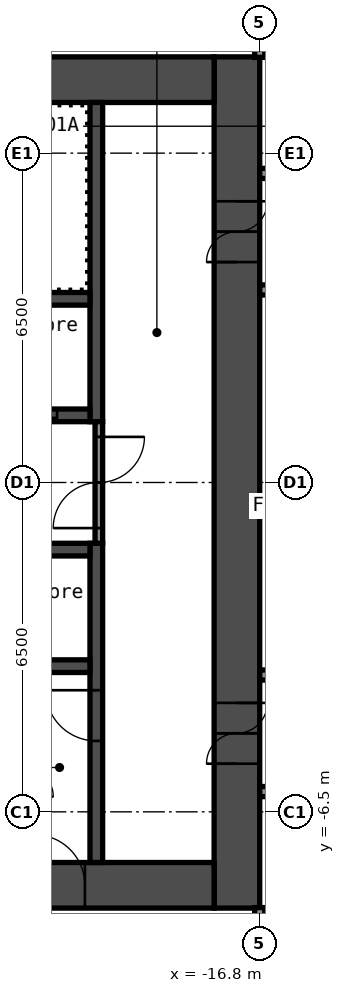
"""IFC4 building model, lengths in metres.
Left out: names, types, materials, properties, quantities, classifications, styles, units other than length and angle.
Written with IfcOpenShell. Run it as: python <this file> out.ifc"""

import sys

from ifc_helpers import new_model, si_unit, direction, frame, frame_2d, origin, place, context, subcontext, project, spatial, rectangle, extrude, element, fill, save


model = new_model("IFC4")
c1 = context("Model", 3, precision=1e-05, world=origin(), true_north=direction((0.0, 1.0)))
c2 = subcontext(c1, "Body", "Model", "MODEL_VIEW")
j1 = project(units=[si_unit("LENGTHUNIT", "METRE"), si_unit("PLANEANGLEUNIT", "RADIAN")], contexts=[c1])
p1 = place(None, origin())
s1 = spatial("IfcSite", under=j1, at=p1, CompositionType="ELEMENT")
p2 = place(p1, origin())
s2 = spatial("IfcBuilding", under=s1, at=p2, CompositionType="ELEMENT")
p3 = place(p2, frame((0.0, 0.0, 29.4)))
s3 = spatial("IfcBuildingStorey", under=s2, at=p3, CompositionType="ELEMENT", Elevation=29.4)
p4 = place(p3, frame((-17.25, -8.4, 0.0), z_axis=(0.0, 0.0, 1.0), x_axis=(0.0, 1.0, 0.0)))
e1 = element("IfcWall", 1, at=p4, inside=s3, PredefinedType="SHEAR", context=c2, shape_type="SweptSolid", body=[
    extrude(rectangle(XDim=16.8, YDim=0.9, at=frame_2d((8.4, 0.0))), origin(), (0.0, 0.0, 1.0), 2.8),
])
p5 = place(p4, frame((12.75, 0.0, 0.0)))
e2 = element("IfcOpeningElement", 2, at=p5, cuts=e1, PredefinedType="OPENING", context=c2, shape_type="SweptSolid", body=[
    extrude(rectangle(XDim=1.2, YDim=2.1, at=frame_2d((0.6, 1.05))), frame((0.0, 0.46, 0.0), z_axis=(0.0, -1.0, 0.0), x_axis=(1.0, 0.0, 0.0)), (0.0, 0.0, 1.0), 0.92),
])
p6 = place(p4, frame((2.85, 0.0, 0.0)))
e3 = element("IfcOpeningElement", 3, at=p6, cuts=e1, PredefinedType="OPENING", context=c2, shape_type="SweptSolid", body=[
    extrude(rectangle(XDim=1.2, YDim=2.1, at=frame_2d((0.6, 1.05))), frame((0.0, 0.46, 0.0), z_axis=(0.0, -1.0, 0.0), x_axis=(1.0, 0.0, 0.0)), (0.0, 0.0, 1.0), 0.92),
])
p7 = place(p3, frame((-32.7, 7.95, 0.0), z_axis=(0.0, 0.0, 1.0), x_axis=(1.0, 0.0, 0.0)))
e4 = element("IfcWall", 4, at=p7, inside=s3, PredefinedType="SHEAR", context=c2, shape_type="SweptSolid", body=[
    extrude(rectangle(XDim=15.0, YDim=0.9, at=frame_2d((7.5, 0.0))), origin(), (0.0, 0.0, 1.0), 2.8),
])
p8 = place(p7, frame((3.4, 0.0, 0.0)))
e5 = element("IfcOpeningElement", 5, at=p8, cuts=e4, PredefinedType="OPENING", context=c2, shape_type="SweptSolid", body=[
    extrude(rectangle(XDim=1.2, YDim=2.1, at=frame_2d((0.6, 1.05))), frame((0.0, 0.46, 0.0), z_axis=(0.0, -1.0, 0.0), x_axis=(1.0, 0.0, 0.0)), (0.0, 0.0, 1.0), 0.92),
])
p9 = place(p7, frame((0.75, 0.0, 0.0)))
e6 = element("IfcOpeningElement", 6, at=p9, cuts=e4, PredefinedType="OPENING", context=c2, shape_type="SweptSolid", body=[
    extrude(rectangle(XDim=0.9, YDim=2.1, at=frame_2d((0.45, 1.05))), frame((0.0, 0.46, 0.0), z_axis=(0.0, -1.0, 0.0), x_axis=(1.0, 0.0, 0.0)), (0.0, 0.0, 1.0), 0.92),
])
p10 = place(p3, frame((-32.7, -7.95, 0.0), z_axis=(0.0, 0.0, 1.0), x_axis=(1.0, 0.0, 0.0)))
e7 = element("IfcWall", 7, at=p10, inside=s3, PredefinedType="SHEAR", context=c2, shape_type="SweptSolid", body=[
    extrude(rectangle(XDim=15.0, YDim=0.9, at=frame_2d((7.5, 0.0))), origin(), (0.0, 0.0, 1.0), 2.8),
])
p11 = place(p10, frame((11.45, 0.0, 0.0)))
e8 = element("IfcOpeningElement", 8, at=p11, cuts=e7, PredefinedType="OPENING", context=c2, shape_type="SweptSolid", body=[
    extrude(rectangle(XDim=1.0, YDim=2.1, at=frame_2d((0.5, 1.05))), frame((0.0, 0.46, 0.0), z_axis=(0.0, -1.0, 0.0), x_axis=(1.0, 0.0, 0.0)), (0.0, 0.0, 1.0), 0.92),
])
p12 = place(p3, frame((-20.025, 1.2, 0.0), z_axis=(0.0, 0.0, 1.0), x_axis=(0.0, 1.0, 0.0)))
e9 = element("IfcWall", 9, at=p12, inside=s3, PredefinedType="SHEAR", context=c2, shape_type="SweptSolid", body=[
    extrude(rectangle(XDim=6.3, YDim=0.25, at=frame_2d((3.15, 0.0))), origin(), (0.0, 0.0, 1.0), 2.8),
])
p13 = place(p3, frame((-20.025, -7.5, 0.0), z_axis=(0.0, 0.0, 1.0), x_axis=(0.0, 1.0, 0.0)))
e10 = element("IfcWall", 10, at=p13, inside=s3, PredefinedType="SHEAR", context=c2, shape_type="SweptSolid", body=[
    extrude(rectangle(XDim=6.3, YDim=0.25, at=frame_2d((3.15, 0.0))), origin(), (0.0, 0.0, 1.0), 2.8),
])
p14 = place(p13, frame((2.4, 0.0, 0.0)))
e11 = element("IfcOpeningElement", 11, at=p14, cuts=e10, PredefinedType="OPENING", context=c2, shape_type="SweptSolid", body=[
    extrude(rectangle(XDim=1.0, YDim=2.1, at=frame_2d((0.5, 1.05))), frame((0.0, 0.135, 0.0), z_axis=(0.0, -1.0, 0.0), x_axis=(1.0, 0.0, 0.0)), (0.0, 0.0, 1.0), 0.27),
])
p15 = place(p3, frame((-27.65, 1.325, 0.0), z_axis=(0.0, 0.0, 1.0), x_axis=(1.0, 0.0, 0.0)))
e12 = element("IfcWall", 12, at=p15, inside=s3, PredefinedType="SHEAR", context=c2, shape_type="SweptSolid", body=[
    extrude(rectangle(XDim=7.5, YDim=0.25, at=frame_2d((3.75, 0.0))), origin(), (0.0, 0.0, 1.0), 2.8),
])
p16 = place(p15, frame((5.75, 0.0, 0.0)))
e13 = element("IfcOpeningElement", 13, at=p16, cuts=e12, PredefinedType="OPENING", context=c2, shape_type="SweptSolid", body=[
    extrude(rectangle(XDim=1.1, YDim=2.1, at=frame_2d((0.55, 1.05))), frame((0.0, 0.135, 0.0), z_axis=(0.0, -1.0, 0.0), x_axis=(1.0, 0.0, 0.0)), (0.0, 0.0, 1.0), 0.27),
])
p17 = place(p15, frame((3.35, 0.0, 0.0)))
e14 = element("IfcOpeningElement", 14, at=p17, cuts=e12, PredefinedType="OPENING", context=c2, shape_type="SweptSolid", body=[
    extrude(rectangle(XDim=1.1, YDim=2.1, at=frame_2d((0.55, 1.05))), frame((0.0, 0.135, 0.0), z_axis=(0.0, -1.0, 0.0), x_axis=(1.0, 0.0, 0.0)), (0.0, 0.0, 1.0), 0.27),
])
p18 = place(p15, frame((0.95, 0.0, 0.0)))
e15 = element("IfcOpeningElement", 15, at=p18, cuts=e12, PredefinedType="OPENING", context=c2, shape_type="SweptSolid", body=[
    extrude(rectangle(XDim=1.1, YDim=2.1, at=frame_2d((0.55, 1.05))), frame((0.0, 0.135, 0.0), z_axis=(0.0, -1.0, 0.0), x_axis=(1.0, 0.0, 0.0)), (0.0, 0.0, 1.0), 0.27),
])
for number, where, z_axis, x_axis in (
    (16, (-27.65, 3.625, 0.0), (0.0, 0.0, 1.0), (1.0, 0.0, 0.0)),
    (17, (-27.65, -1.325, 0.0), (0.0, 0.0, 1.0), (1.0, 0.0, 0.0)),
    (18, (-27.65, -3.625, 0.0), (0.0, 0.0, 1.0), (1.0, 0.0, 0.0)),
):
    element("IfcWall", number, at=place(p3, frame(where, z_axis=z_axis, x_axis=x_axis)), inside=s3, PredefinedType="SHEAR", context=c2, shape_type="SweptSolid", body=[
        extrude(rectangle(XDim=7.5, YDim=0.25, at=frame_2d((3.75, 0.0))), origin(), (0.0, 0.0, 1.0), 2.8),
    ])
p19 = place(p3, frame((-19.975, -1.2, 0.0), z_axis=(0.0, 0.0, 1.0), x_axis=(0.0, 1.0, 0.0)))
e19 = element("IfcWall", 19, at=p19, inside=s3, PredefinedType="PARTITIONING", context=c2, shape_type="SweptSolid", body=[
    extrude(rectangle(XDim=2.4, YDim=0.15, at=frame_2d((1.2, 0.0))), origin(), (0.0, 0.0, 1.0), 2.8),
])
p20 = place(p19, frame((0.3, 0.0, 0.0)))
e20 = element("IfcOpeningElement", 20, at=p20, cuts=e19, PredefinedType="OPENING", context=c2, shape_type="SweptSolid", body=[
    extrude(rectangle(XDim=1.8, YDim=2.1, at=frame_2d((0.9, 1.05))), frame((0.0, 0.085, 0.0), z_axis=(0.0, -1.0, 0.0), x_axis=(1.0, 0.0, 0.0)), (0.0, 0.0, 1.0), 0.17),
])
p21 = place(p3, frame((-16.8, -6.1, 0.0), z_axis=(0.0, 0.0, 1.0), x_axis=(1.0, 0.0, 0.0)))
e21 = element("IfcWall", 21, at=p21, inside=s3, PredefinedType="PARTITIONING", context=c2, shape_type="SweptSolid", body=[
    extrude(rectangle(XDim=33.6, YDim=0.2, at=frame_2d((16.8, 0.0))), origin(), (0.0, 0.0, 1.0), 2.8),
])
p22 = place(p21, frame((2.85, 0.0, 0.0)))
e22 = element("IfcOpeningElement", 22, at=p22, cuts=e21, PredefinedType="OPENING", context=c2, shape_type="SweptSolid", body=[
    extrude(rectangle(XDim=1.0, YDim=2.1, at=frame_2d((0.5, 1.05))), frame((0.0, 0.11, 0.0), z_axis=(0.0, -1.0, 0.0), x_axis=(1.0, 0.0, 0.0)), (0.0, 0.0, 1.0), 0.22),
])
p23 = place(p21, frame((4.55, 0.0, 0.0)))
e23 = element("IfcOpeningElement", 23, at=p23, cuts=e21, PredefinedType="OPENING", context=c2, shape_type="SweptSolid", body=[
    extrude(rectangle(XDim=1.0, YDim=2.1, at=frame_2d((0.5, 1.05))), frame((0.0, 0.11, 0.0), z_axis=(0.0, -1.0, 0.0), x_axis=(1.0, 0.0, 0.0)), (0.0, 0.0, 1.0), 0.22),
])
p24 = place(p21, frame((12.1, 0.0, 0.0)))
e24 = element("IfcOpeningElement", 24, at=p24, cuts=e21, PredefinedType="OPENING", context=c2, shape_type="SweptSolid", body=[
    extrude(rectangle(XDim=1.0, YDim=2.1, at=frame_2d((0.5, 1.05))), frame((0.0, 0.11, 0.0), z_axis=(0.0, -1.0, 0.0), x_axis=(1.0, 0.0, 0.0)), (0.0, 0.0, 1.0), 0.22),
])
p25 = place(p21, frame((19.65, 0.0, 0.0)))
e25 = element("IfcOpeningElement", 25, at=p25, cuts=e21, PredefinedType="OPENING", context=c2, shape_type="SweptSolid", body=[
    extrude(rectangle(XDim=1.0, YDim=2.1, at=frame_2d((0.5, 1.05))), frame((0.0, 0.11, 0.0), z_axis=(0.0, -1.0, 0.0), x_axis=(1.0, 0.0, 0.0)), (0.0, 0.0, 1.0), 0.22),
])
p26 = place(p21, frame((21.35, 0.0, 0.0)))
e26 = element("IfcOpeningElement", 26, at=p26, cuts=e21, PredefinedType="OPENING", context=c2, shape_type="SweptSolid", body=[
    extrude(rectangle(XDim=1.0, YDim=2.1, at=frame_2d((0.5, 1.05))), frame((0.0, 0.11, 0.0), z_axis=(0.0, -1.0, 0.0), x_axis=(1.0, 0.0, 0.0)), (0.0, 0.0, 1.0), 0.22),
])
p27 = place(p21, frame((27.2, 0.0, 0.0)))
e27 = element("IfcOpeningElement", 27, at=p27, cuts=e21, PredefinedType="OPENING", context=c2, shape_type="SweptSolid", body=[
    extrude(rectangle(XDim=1.0, YDim=2.1, at=frame_2d((0.5, 1.05))), frame((0.0, 0.11, 0.0), z_axis=(0.0, -1.0, 0.0), x_axis=(1.0, 0.0, 0.0)), (0.0, 0.0, 1.0), 0.22),
])
p28 = place(p3, frame((-16.8, -3.8, 0.0), z_axis=(0.0, 0.0, 1.0), x_axis=(1.0, 0.0, 0.0)))
e28 = element("IfcWall", 28, at=p28, inside=s3, PredefinedType="PARTITIONING", context=c2, shape_type="SweptSolid", body=[
    extrude(rectangle(XDim=33.6, YDim=0.2, at=frame_2d((16.8, 0.0))), origin(), (0.0, 0.0, 1.0), 2.8),
])
p29 = place(p28, frame((10.22, 0.0, 0.0)))
e29 = element("IfcOpeningElement", 29, at=p29, cuts=e28, PredefinedType="OPENING", context=c2, shape_type="SweptSolid", body=[
    extrude(rectangle(XDim=0.9, YDim=2.1, at=frame_2d((0.45, 1.05))), frame((0.0, 0.11, 0.0), z_axis=(0.0, -1.0, 0.0), x_axis=(1.0, 0.0, 0.0)), (0.0, 0.0, 1.0), 0.22),
])
p30 = place(p28, frame((14.42, 0.0, 0.0)))
e30 = element("IfcOpeningElement", 30, at=p30, cuts=e28, PredefinedType="OPENING", context=c2, shape_type="SweptSolid", body=[
    extrude(rectangle(XDim=0.9, YDim=2.1, at=frame_2d((0.45, 1.05))), frame((0.0, 0.11, 0.0), z_axis=(0.0, -1.0, 0.0), x_axis=(1.0, 0.0, 0.0)), (0.0, 0.0, 1.0), 0.22),
])
p31 = place(p28, frame((26.6, 0.0, 0.0)))
e31 = element("IfcOpeningElement", 31, at=p31, cuts=e28, PredefinedType="OPENING", context=c2, shape_type="SweptSolid", body=[
    extrude(rectangle(XDim=0.9, YDim=2.1, at=frame_2d((0.45, 1.05))), frame((0.0, 0.11, 0.0), z_axis=(0.0, -1.0, 0.0), x_axis=(1.0, 0.0, 0.0)), (0.0, 0.0, 1.0), 0.22),
])
p32 = place(p28, frame((30.8, 0.0, 0.0)))
e32 = element("IfcOpeningElement", 32, at=p32, cuts=e28, PredefinedType="OPENING", context=c2, shape_type="SweptSolid", body=[
    extrude(rectangle(XDim=0.9, YDim=2.1, at=frame_2d((0.45, 1.05))), frame((0.0, 0.11, 0.0), z_axis=(0.0, -1.0, 0.0), x_axis=(1.0, 0.0, 0.0)), (0.0, 0.0, 1.0), 0.22),
])
p33 = place(p3, frame((-16.8, 3.8, 0.0), z_axis=(0.0, 0.0, 1.0), x_axis=(1.0, 0.0, 0.0)))
e33 = element("IfcWall", 33, at=p33, inside=s3, PredefinedType="PARTITIONING", context=c2, shape_type="SweptSolid", body=[
    extrude(rectangle(XDim=33.6, YDim=0.2, at=frame_2d((16.8, 0.0))), origin(), (0.0, 0.0, 1.0), 2.8),
])
p34 = place(p33, frame((1.23, 0.0, 0.0)))
e34 = element("IfcOpeningElement", 34, at=p34, cuts=e33, PredefinedType="OPENING", context=c2, shape_type="SweptSolid", body=[
    extrude(rectangle(XDim=0.9, YDim=2.1, at=frame_2d((0.45, 1.05))), frame((0.0, 0.11, 0.0), z_axis=(0.0, -1.0, 0.0), x_axis=(1.0, 0.0, 0.0)), (0.0, 0.0, 1.0), 0.22),
])
p35 = place(p33, frame((5.43, 0.0, 0.0)))
e35 = element("IfcOpeningElement", 35, at=p35, cuts=e33, PredefinedType="OPENING", context=c2, shape_type="SweptSolid", body=[
    extrude(rectangle(XDim=0.9, YDim=2.1, at=frame_2d((0.45, 1.05))), frame((0.0, 0.11, 0.0), z_axis=(0.0, -1.0, 0.0), x_axis=(1.0, 0.0, 0.0)), (0.0, 0.0, 1.0), 0.22),
])
p36 = place(p33, frame((18.955, 0.0, 0.0)))
e36 = element("IfcOpeningElement", 36, at=p36, cuts=e33, PredefinedType="OPENING", context=c2, shape_type="SweptSolid", body=[
    extrude(rectangle(XDim=0.9, YDim=2.1, at=frame_2d((0.45, 1.05))), frame((0.0, 0.11, 0.0), z_axis=(0.0, -1.0, 0.0), x_axis=(1.0, 0.0, 0.0)), (0.0, 0.0, 1.0), 0.22),
])
p37 = place(p33, frame((23.155, 0.0, 0.0)))
e37 = element("IfcOpeningElement", 37, at=p37, cuts=e33, PredefinedType="OPENING", context=c2, shape_type="SweptSolid", body=[
    extrude(rectangle(XDim=0.9, YDim=2.1, at=frame_2d((0.45, 1.05))), frame((0.0, 0.11, 0.0), z_axis=(0.0, -1.0, 0.0), x_axis=(1.0, 0.0, 0.0)), (0.0, 0.0, 1.0), 0.22),
])
p38 = place(p3, frame((-16.8, 6.1, 0.0), z_axis=(0.0, 0.0, 1.0), x_axis=(1.0, 0.0, 0.0)))
e38 = element("IfcWall", 38, at=p38, inside=s3, PredefinedType="PARTITIONING", context=c2, shape_type="SweptSolid", body=[
    extrude(rectangle(XDim=33.6, YDim=0.2, at=frame_2d((16.8, 0.0))), origin(), (0.0, 0.0, 1.0), 2.8),
])
p39 = place(p38, frame((2.85, 0.0, 0.0)))
e39 = element("IfcOpeningElement", 39, at=p39, cuts=e38, PredefinedType="OPENING", context=c2, shape_type="SweptSolid", body=[
    extrude(rectangle(XDim=1.0, YDim=2.1, at=frame_2d((0.5, 1.05))), frame((0.0, 0.11, 0.0), z_axis=(0.0, -1.0, 0.0), x_axis=(1.0, 0.0, 0.0)), (0.0, 0.0, 1.0), 0.22),
])
p40 = place(p38, frame((4.55, 0.0, 0.0)))
e40 = element("IfcOpeningElement", 40, at=p40, cuts=e38, PredefinedType="OPENING", context=c2, shape_type="SweptSolid", body=[
    extrude(rectangle(XDim=1.0, YDim=2.1, at=frame_2d((0.5, 1.05))), frame((0.0, 0.11, 0.0), z_axis=(0.0, -1.0, 0.0), x_axis=(1.0, 0.0, 0.0)), (0.0, 0.0, 1.0), 0.22),
])
p41 = place(p38, frame((13.8, 0.0, 0.0)))
e41 = element("IfcOpeningElement", 41, at=p41, cuts=e38, PredefinedType="OPENING", context=c2, shape_type="SweptSolid", body=[
    extrude(rectangle(XDim=1.0, YDim=2.1, at=frame_2d((0.5, 1.05))), frame((0.0, 0.11, 0.0), z_axis=(0.0, -1.0, 0.0), x_axis=(1.0, 0.0, 0.0)), (0.0, 0.0, 1.0), 0.22),
])
p42 = place(p38, frame((19.65, 0.0, 0.0)))
e42 = element("IfcOpeningElement", 42, at=p42, cuts=e38, PredefinedType="OPENING", context=c2, shape_type="SweptSolid", body=[
    extrude(rectangle(XDim=1.0, YDim=2.1, at=frame_2d((0.5, 1.05))), frame((0.0, 0.11, 0.0), z_axis=(0.0, -1.0, 0.0), x_axis=(1.0, 0.0, 0.0)), (0.0, 0.0, 1.0), 0.22),
])
p43 = place(p38, frame((21.35, 0.0, 0.0)))
e43 = element("IfcOpeningElement", 43, at=p43, cuts=e38, PredefinedType="OPENING", context=c2, shape_type="SweptSolid", body=[
    extrude(rectangle(XDim=1.0, YDim=2.1, at=frame_2d((0.5, 1.05))), frame((0.0, 0.11, 0.0), z_axis=(0.0, -1.0, 0.0), x_axis=(1.0, 0.0, 0.0)), (0.0, 0.0, 1.0), 0.22),
])
p44 = place(p38, frame((27.2, 0.0, 0.0)))
e44 = element("IfcOpeningElement", 44, at=p44, cuts=e38, PredefinedType="OPENING", context=c2, shape_type="SweptSolid", body=[
    extrude(rectangle(XDim=1.0, YDim=2.1, at=frame_2d((0.5, 1.05))), frame((0.0, 0.11, 0.0), z_axis=(0.0, -1.0, 0.0), x_axis=(1.0, 0.0, 0.0)), (0.0, 0.0, 1.0), 0.22),
])
for number, where, z_axis, x_axis in (
    (45, (-16.8, -20.3, 0.0), (0.0, 0.0, 1.0), (0.0, 1.0, 0.0)),
    (46, (-16.8, 8.39, 0.0), (0.0, 0.0, 1.0), (0.0, 1.0, 0.0)),
):
    element("IfcWall", number, at=place(p3, frame(where, z_axis=z_axis, x_axis=x_axis)), inside=s3, PredefinedType="PARTITIONING", context=c2, shape_type="SweptSolid", body=[
        extrude(rectangle(XDim=11.91, YDim=0.2, at=frame_2d((5.955, 0.0))), origin(), (0.0, 0.0, 1.0), 2.8),
    ])
p45 = place(p5, origin())
e47 = element("IfcDoor", 47, at=p45, inside=s3, OperationType="DOUBLE_DOOR_SINGLE_SWING", PredefinedType="DOOR", context=c2, shape_type="SweptSolid", body=[
    extrude(rectangle(XDim=1.2, YDim=2.1, at=frame_2d((0.6, 1.05))), frame((0.0, 0.025, 0.0), z_axis=(0.0, -1.0, 0.0), x_axis=(1.0, 0.0, 0.0)), (0.0, 0.0, 1.0), 0.05),
])
fill(e2, e47)
p46 = place(p6, origin())
e48 = element("IfcDoor", 48, at=p46, inside=s3, OperationType="DOUBLE_DOOR_SINGLE_SWING", PredefinedType="DOOR", context=c2, shape_type="SweptSolid", body=[
    extrude(rectangle(XDim=1.2, YDim=2.1, at=frame_2d((0.6, 1.05))), frame((0.0, 0.025, 0.0), z_axis=(0.0, -1.0, 0.0), x_axis=(1.0, 0.0, 0.0)), (0.0, 0.0, 1.0), 0.05),
])
fill(e3, e48)
p47 = place(p11, origin())
e49 = element("IfcDoor", 49, at=p47, inside=s3, OperationType="SINGLE_SWING_RIGHT", PredefinedType="DOOR", context=c2, shape_type="SweptSolid", body=[
    extrude(rectangle(XDim=1.0, YDim=2.1, at=frame_2d((0.5, 1.05))), frame((0.0, 0.025, 0.0), z_axis=(0.0, -1.0, 0.0), x_axis=(1.0, 0.0, 0.0)), (0.0, 0.0, 1.0), 0.05),
])
fill(e8, e49)
p48 = place(p14, origin())
e50 = element("IfcDoor", 50, at=p48, inside=s3, OperationType="SINGLE_SWING_LEFT", PredefinedType="DOOR", context=c2, shape_type="SweptSolid", body=[
    extrude(rectangle(XDim=1.0, YDim=2.1, at=frame_2d((0.5, 1.05))), frame((0.0, 0.025, 0.0), z_axis=(0.0, -1.0, 0.0), x_axis=(1.0, 0.0, 0.0)), (0.0, 0.0, 1.0), 0.05),
])
fill(e11, e50)
p49 = place(p20, origin())
e51 = element("IfcDoor", 51, at=p49, inside=s3, OperationType="DOUBLE_DOOR_SINGLE_SWING", PredefinedType="DOOR", context=c2, shape_type="SweptSolid", body=[
    extrude(rectangle(XDim=1.8, YDim=2.1, at=frame_2d((0.9, 1.05))), frame((0.0, 0.025, 0.0), z_axis=(0.0, -1.0, 0.0), x_axis=(1.0, 0.0, 0.0)), (0.0, 0.0, 1.0), 0.05),
])
fill(e20, e51)
p50 = place(p16, origin())
e52 = element("IfcDoor", 52, at=p50, inside=s3, OperationType="DOUBLE_DOOR_SLIDING", PredefinedType="DOOR", context=c2, shape_type="SweptSolid", body=[
    extrude(rectangle(XDim=1.1, YDim=2.1, at=frame_2d((0.55, 1.05))), frame((0.0, 0.025, 0.0), z_axis=(0.0, -1.0, 0.0), x_axis=(1.0, 0.0, 0.0)), (0.0, 0.0, 1.0), 0.05),
])
fill(e13, e52)
save(model, sys.argv[1])
